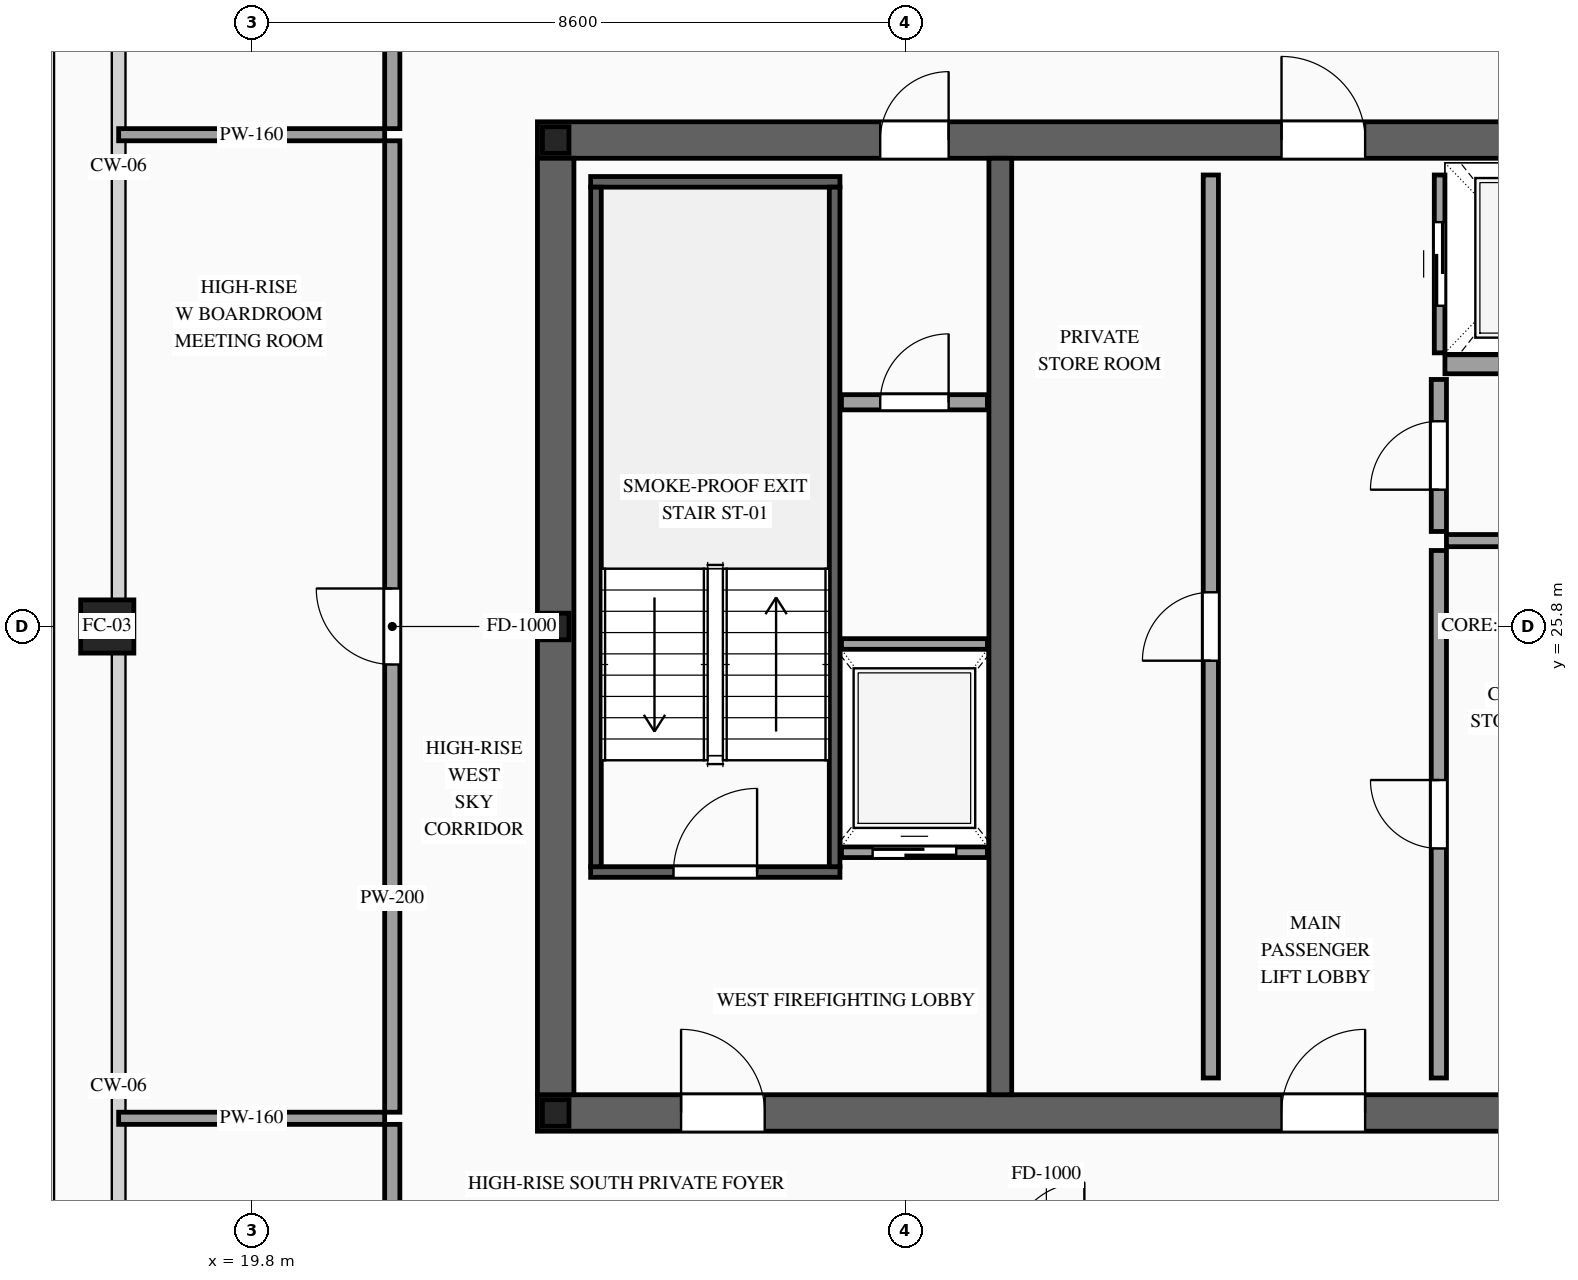
"""IFC4 building model, lengths in metres.
Left out: names, types, materials, properties, quantities, classifications, styles, units other than length and angle.
Written with IfcOpenShell. Run it as: python <this file> out.ifc"""

import sys

from ifc_helpers import new_model, si_unit, direction, frame, frame_2d, origin, origin_2d, place, context, subcontext, project, spatial, rectangle, hollow_rectangle, i_section, extrude, source, transform, mapped, element, fill, save


model = new_model("IFC4")
c1 = context("Model", 3, precision=1e-05, world=origin(), true_north=direction((0.0, 1.0)))
c2 = subcontext(c1, "Body", "Model", "MODEL_VIEW")
j1 = project(units=[si_unit("LENGTHUNIT", "METRE"), si_unit("PLANEANGLEUNIT", "RADIAN")], contexts=[c1])
p1 = place(None, origin())
s1 = spatial("IfcSite", under=j1, at=p1, CompositionType="ELEMENT")
p2 = place(p1, origin())
s2 = spatial("IfcBuilding", under=s1, at=p2, CompositionType="ELEMENT")
p3 = place(p2, frame((0.0, 0.0, 325.2)))
s3 = spatial("IfcBuildingStorey", under=s2, at=p3, CompositionType="ELEMENT", Elevation=325.2)
p4 = place(p3, frame((23.56, 19.4, 0.0), z_axis=(0.0, 0.0, 1.0), x_axis=(1.0, 0.0, 0.0)))
e1 = element("IfcWall", 1, at=p4, inside=s3, PredefinedType="SHEAR", context=c2, shape_type="SweptSolid", body=[
    extrude(rectangle(XDim=26.88, YDim=0.48, at=frame_2d((13.44, 0.0))), origin(), (0.0, 0.0, 1.0), 3.5),
])
p5 = place(p4, frame((1.89, 0.0, 0.0)))
e2 = element("IfcOpeningElement", 2, at=p5, cuts=e1, PredefinedType="OPENING", context=c2, shape_type="SweptSolid", body=[
    extrude(rectangle(XDim=1.1, YDim=2.2, at=frame_2d((0.55, 1.1))), frame((0.0, 0.255, 0.0), z_axis=(0.0, -1.0, 0.0), x_axis=(1.0, 0.0, 0.0)), (0.0, 0.0, 1.0), 0.51),
])
p6 = place(p4, frame((9.79, 0.0, 0.0)))
e3 = element("IfcOpeningElement", 3, at=p6, cuts=e1, PredefinedType="OPENING", context=c2, shape_type="SweptSolid", body=[
    extrude(rectangle(XDim=1.1, YDim=2.2, at=frame_2d((0.55, 1.1))), frame((0.0, 0.255, 0.0), z_axis=(0.0, -1.0, 0.0), x_axis=(1.0, 0.0, 0.0)), (0.0, 0.0, 1.0), 0.51),
])
p7 = place(p4, frame((22.99, 0.0, 0.0)))
e4 = element("IfcOpeningElement", 4, at=p7, cuts=e1, PredefinedType="OPENING", context=c2, shape_type="SweptSolid", body=[
    extrude(rectangle(XDim=1.1, YDim=2.2, at=frame_2d((0.55, 1.1))), frame((0.0, 0.255, 0.0), z_axis=(0.0, -1.0, 0.0), x_axis=(1.0, 0.0, 0.0)), (0.0, 0.0, 1.0), 0.51),
])
p8 = place(p4, frame((19.61, 0.0, 0.0)))
e5 = element("IfcOpeningElement", 5, at=p8, cuts=e1, PredefinedType="OPENING", context=c2, shape_type="SweptSolid", body=[
    extrude(rectangle(XDim=0.9, YDim=2.15, at=frame_2d((0.45, 1.075))), frame((0.0, 0.255, 0.0), z_axis=(0.0, -1.0, 0.0), x_axis=(1.0, 0.0, 0.0)), (0.0, 0.0, 1.0), 0.51),
])
p9 = place(p4, frame((18.17, 0.0, 0.0)))
e6 = element("IfcOpeningElement", 6, at=p9, cuts=e1, PredefinedType="OPENING", context=c2, shape_type="SweptSolid", body=[
    extrude(rectangle(XDim=0.9, YDim=2.15, at=frame_2d((0.45, 1.075))), frame((0.0, 0.255, 0.0), z_axis=(0.0, -1.0, 0.0), x_axis=(1.0, 0.0, 0.0)), (0.0, 0.0, 1.0), 0.51),
])
p10 = place(p3, frame((23.56, 32.2, 0.0), z_axis=(0.0, 0.0, 1.0), x_axis=(1.0, 0.0, 0.0)))
e7 = element("IfcWall", 7, at=p10, inside=s3, PredefinedType="SHEAR", context=c2, shape_type="SweptSolid", body=[
    extrude(rectangle(XDim=26.88, YDim=0.48, at=frame_2d((13.44, 0.0))), origin(), (0.0, 0.0, 1.0), 3.5),
])
p11 = place(p10, frame((4.51, 0.0, 0.0)))
e8 = element("IfcOpeningElement", 8, at=p11, cuts=e7, PredefinedType="OPENING", context=c2, shape_type="SweptSolid", body=[
    extrude(rectangle(XDim=0.9, YDim=2.15, at=frame_2d((0.45, 1.075))), frame((0.0, 0.255, 0.0), z_axis=(0.0, -1.0, 0.0), x_axis=(1.0, 0.0, 0.0)), (0.0, 0.0, 1.0), 0.51),
])
p12 = place(p10, frame((9.79, 0.0, 0.0)))
e9 = element("IfcOpeningElement", 9, at=p12, cuts=e7, PredefinedType="OPENING", context=c2, shape_type="SweptSolid", body=[
    extrude(rectangle(XDim=1.1, YDim=2.2, at=frame_2d((0.55, 1.1))), frame((0.0, 0.255, 0.0), z_axis=(0.0, -1.0, 0.0), x_axis=(1.0, 0.0, 0.0)), (0.0, 0.0, 1.0), 0.51),
])
p13 = place(p10, frame((15.64, 0.0, 0.0)))
e10 = element("IfcOpeningElement", 10, at=p13, cuts=e7, PredefinedType="OPENING", context=c2, shape_type="SweptSolid", body=[
    extrude(rectangle(XDim=1.1, YDim=2.2, at=frame_2d((0.55, 1.1))), frame((0.0, 0.255, 0.0), z_axis=(0.0, -1.0, 0.0), x_axis=(1.0, 0.0, 0.0)), (0.0, 0.0, 1.0), 0.51),
])
p14 = place(p10, frame((18.74, 0.0, 0.0)))
e11 = element("IfcOpeningElement", 11, at=p14, cuts=e7, PredefinedType="OPENING", context=c2, shape_type="SweptSolid", body=[
    extrude(rectangle(XDim=1.1, YDim=2.2, at=frame_2d((0.55, 1.1))), frame((0.0, 0.255, 0.0), z_axis=(0.0, -1.0, 0.0), x_axis=(1.0, 0.0, 0.0)), (0.0, 0.0, 1.0), 0.51),
])
m1 = source(origin(), c2, "Body", "SweptSolid", [
    extrude(rectangle(XDim=12.32, YDim=0.48, at=frame_2d((6.16, 0.0))), origin(), (0.0, 0.0, 1.0), 3.5),
])
p15 = place(p3, frame((23.8, 19.64, 0.0), z_axis=(0.0, 0.0, 1.0), x_axis=(0.0, 1.0, 0.0)))
e12 = element("IfcWall", 12, at=p15, inside=s3, PredefinedType="SHEAR", context=c2, shape_type="MappedRepresentation", body=[
    mapped(m1, transform((0.0, 0.0, 0.0), scale=1.0)),
])
m2 = source(origin(), c2, "Body", "SweptSolid", [
    extrude(rectangle(XDim=12.32, YDim=0.3, at=frame_2d((6.16, 0.0))), origin(), (0.0, 0.0, 1.0), 3.5),
])
p16 = place(p3, frame((29.65, 19.64, 0.0), z_axis=(0.0, 0.0, 1.0), x_axis=(0.0, 1.0, 0.0)))
e13 = element("IfcWall", 13, at=p16, inside=s3, PredefinedType="SOLIDWALL", context=c2, shape_type="MappedRepresentation", body=[
    mapped(m2, transform((0.0, 0.0, 0.0), scale=1.0)),
])
m3 = source(origin(), c2, "Body", "SweptSolid", [
    extrude(i_section(OverallWidth=0.35, OverallDepth=0.35, WebThickness=0.012, FlangeThickness=0.019, at=origin_2d()), origin(), (0.0, 0.0, 1.0), 3.5),
])
for number, where, z_axis, x_axis in (
    (14, (23.8, 19.4, 0.0), (0.0, 0.0, 1.0), (1.0, 0.0, 0.0)),
    (15, (23.8, 25.8, 0.0), (0.0, 0.0, 1.0), (1.0, 0.0, 0.0)),
    (16, (23.8, 32.2, 0.0), (0.0, 0.0, 1.0), (1.0, 0.0, 0.0)),
):
    element("IfcColumn", number, at=place(p3, frame(where, z_axis=z_axis, x_axis=x_axis)), inside=s3, PredefinedType="COLUMN", context=c2, shape_type="MappedRepresentation", body=[
        mapped(m3, transform((0.0, 0.0, 0.0), scale=1.0)),
    ])
m4 = source(origin(), c2, "Body", "SweptSolid", [
    extrude(hollow_rectangle(XDim=0.7, YDim=0.7, WallThickness=0.032, at=origin_2d()), origin(), (0.0, 0.0, 1.0), 3.5),
])
p17 = place(p3, frame((17.9, 25.8, 0.0), z_axis=(0.0, 0.0, 1.0), x_axis=(1.0, 0.0, 0.0)))
e17 = element("IfcColumn", 17, at=p17, inside=s3, PredefinedType="COLUMN", context=c2, shape_type="MappedRepresentation", body=[
    mapped(m4, transform((0.0, 0.0, 0.0), scale=1.0)),
])
p18 = place(p3, frame((27.56, 22.83, 0.0), z_axis=(0.0, 0.0, 1.0), x_axis=(1.0, 0.0, 0.0)))
e18 = element("IfcWall", 18, at=p18, inside=s3, PredefinedType="SOLIDWALL", context=c2, shape_type="SweptSolid", body=[
    extrude(rectangle(XDim=1.92, YDim=0.14, at=frame_2d((0.96, 0.0))), origin(), (0.0, 0.0, 1.0), 3.28),
])
p19 = place(p18, frame((0.41, 0.0, 0.0)))
e19 = element("IfcOpeningElement", 19, at=p19, cuts=e18, PredefinedType="OPENING", context=c2, shape_type="SweptSolid", body=[
    extrude(rectangle(XDim=1.1, YDim=2.2, at=frame_2d((0.55, 1.1))), frame((0.0, 0.085, 0.0), z_axis=(0.0, -1.0, 0.0), x_axis=(1.0, 0.0, 0.0)), (0.0, 0.0, 1.0), 0.17),
])
m5 = source(origin(), c2, "Body", "SweptSolid", [
    extrude(rectangle(XDim=1.92, YDim=0.14, at=frame_2d((0.96, 0.0))), origin(), (0.0, 0.0, 1.0), 3.28),
])
p20 = place(p3, frame((27.56, 25.57, 0.0), z_axis=(0.0, 0.0, 1.0), x_axis=(1.0, 0.0, 0.0)))
e20 = element("IfcWall", 20, at=p20, inside=s3, PredefinedType="SOLIDWALL", context=c2, shape_type="MappedRepresentation", body=[
    mapped(m5, transform((0.0, 0.0, 0.0), scale=1.0)),
])
p21 = place(p3, frame((35.43, 29.4, 0.0), z_axis=(0.0, 0.0, 1.0), x_axis=(0.0, 1.0, 0.0)))
e21 = element("IfcWall", 21, at=p21, inside=s3, PredefinedType="SOLIDWALL", context=c2, shape_type="SweptSolid", body=[
    extrude(rectangle(XDim=2.34, YDim=0.14, at=frame_2d((1.17, 0.0))), origin(), (0.0, 0.0, 1.0), 3.28),
])
p22 = place(p21, frame((0.62, 0.0, 0.0)))
e22 = element("IfcOpeningElement", 22, at=p22, cuts=e21, PredefinedType="OPENING", context=c2, shape_type="SweptSolid", body=[
    extrude(rectangle(XDim=1.1, YDim=2.2, at=frame_2d((0.55, 1.1))), frame((0.0, 0.085, 0.0), z_axis=(0.0, -1.0, 0.0), x_axis=(1.0, 0.0, 0.0)), (0.0, 0.0, 1.0), 0.17),
])
m6 = source(origin(), c2, "Body", "SweptSolid", [
    extrude(rectangle(XDim=2.4, YDim=0.25, at=frame_2d((1.2, 0.0))), origin(), (0.0, 0.0, 1.0), 3.28),
])
p23 = place(p3, frame((35.5, 29.25, 0.0), z_axis=(0.0, 0.0, 1.0), x_axis=(1.0, 0.0, 0.0)))
e23 = element("IfcWall", 23, at=p23, inside=s3, PredefinedType="SOLIDWALL", context=c2, shape_type="MappedRepresentation", body=[
    mapped(m6, transform((0.0, 0.0, 0.0), scale=1.0)),
])
p24 = place(p3, frame((24.26, 22.57, 0.0), z_axis=(0.0, 0.0, 1.0), x_axis=(1.0, 0.0, 0.0)))
e24 = element("IfcWall", 24, at=p24, inside=s3, PredefinedType="SOLIDWALL", context=c2, shape_type="SweptSolid", body=[
    extrude(rectangle(XDim=3.28, YDim=0.14, at=frame_2d((1.64, 0.0))), origin(), (0.0, 0.0, 1.0), 3.28),
])
p25 = place(p24, frame((1.09, 0.0, 0.0)))
e25 = element("IfcOpeningElement", 25, at=p25, cuts=e24, PredefinedType="OPENING", context=c2, shape_type="SweptSolid", body=[
    extrude(rectangle(XDim=1.1, YDim=2.2, at=frame_2d((0.55, 1.1))), frame((0.0, 0.085, 0.0), z_axis=(0.0, -1.0, 0.0), x_axis=(1.0, 0.0, 0.0)), (0.0, 0.0, 1.0), 0.17),
])
m7 = source(origin(), c2, "Body", "SweptSolid", [
    extrude(rectangle(XDim=3.28, YDim=0.14, at=frame_2d((1.64, 0.0))), origin(), (0.0, 0.0, 1.0), 3.28),
])
p26 = place(p3, frame((24.26, 31.65, 0.0), z_axis=(0.0, 0.0, 1.0), x_axis=(1.0, 0.0, 0.0)))
e26 = element("IfcWall", 26, at=p26, inside=s3, PredefinedType="SOLIDWALL", context=c2, shape_type="MappedRepresentation", body=[
    mapped(m7, transform((0.0, 0.0, 0.0), scale=1.0)),
])
m8 = source(origin(), c2, "Body", "SweptSolid", [
    extrude(rectangle(XDim=8.94, YDim=0.14, at=frame_2d((4.47, 0.0))), origin(), (0.0, 0.0, 1.0), 3.28),
])
for number, where, z_axis, x_axis in (
    (27, (24.33, 22.64, 0.0), (0.0, 0.0, 1.0), (0.0, 1.0, 0.0)),
    (28, (27.47, 22.64, 0.0), (0.0, 0.0, 1.0), (0.0, 1.0, 0.0)),
):
    element("IfcWall", number, at=place(p3, frame(where, z_axis=z_axis, x_axis=x_axis)), inside=s3, PredefinedType="SOLIDWALL", context=c2, shape_type="MappedRepresentation", body=[
        mapped(m8, transform((0.0, 0.0, 0.0), scale=1.0)),
    ])
p27 = place(p3, frame((27.56, 28.75, 0.0), z_axis=(0.0, 0.0, 1.0), x_axis=(1.0, 0.0, 0.0)))
e29 = element("IfcWall", 29, at=p27, inside=s3, PredefinedType="PARTITIONING", context=c2, shape_type="SweptSolid", body=[
    extrude(rectangle(XDim=1.92, YDim=0.2, at=frame_2d((0.96, 0.0))), origin(), (0.0, 0.0, 1.0), 3.28),
])
p28 = place(p27, frame((0.51, 0.0, 0.0)))
e30 = element("IfcOpeningElement", 30, at=p28, cuts=e29, PredefinedType="OPENING", context=c2, shape_type="SweptSolid", body=[
    extrude(rectangle(XDim=0.9, YDim=2.15, at=frame_2d((0.45, 1.075))), frame((0.0, 0.115, 0.0), z_axis=(0.0, -1.0, 0.0), x_axis=(1.0, 0.0, 0.0)), (0.0, 0.0, 1.0), 0.23),
])
p29 = place(p3, frame((32.42, 19.86, 0.0), z_axis=(0.0, 0.0, 1.0), x_axis=(0.0, 1.0, 0.0)))
e31 = element("IfcWall", 31, at=p29, inside=s3, PredefinedType="PARTITIONING", context=c2, shape_type="SweptSolid", body=[
    extrude(rectangle(XDim=11.88, YDim=0.2, at=frame_2d((5.94, 0.0))), origin(), (0.0, 0.0, 1.0), 3.28),
])
p30 = place(p29, frame((5.49, 0.0, 0.0)))
e32 = element("IfcOpeningElement", 32, at=p30, cuts=e31, PredefinedType="OPENING", context=c2, shape_type="SweptSolid", body=[
    extrude(rectangle(XDim=0.9, YDim=2.15, at=frame_2d((0.45, 1.075))), frame((0.0, 0.115, 0.0), z_axis=(0.0, -1.0, 0.0), x_axis=(1.0, 0.0, 0.0)), (0.0, 0.0, 1.0), 0.23),
])
p31 = place(p3, frame((35.42, 19.86, 0.0), z_axis=(0.0, 0.0, 1.0), x_axis=(0.0, 1.0, 0.0)))
e33 = element("IfcWall", 33, at=p31, inside=s3, PredefinedType="PARTITIONING", context=c2, shape_type="SweptSolid", body=[
    extrude(rectangle(XDim=6.94, YDim=0.2, at=frame_2d((3.47, 0.0))), origin(), (0.0, 0.0, 1.0), 3.28),
])
p32 = place(p31, frame((3.02, 0.0, 0.0)))
e34 = element("IfcOpeningElement", 34, at=p32, cuts=e33, PredefinedType="OPENING", context=c2, shape_type="SweptSolid", body=[
    extrude(rectangle(XDim=0.9, YDim=2.15, at=frame_2d((0.45, 1.075))), frame((0.0, 0.115, 0.0), z_axis=(0.0, -1.0, 0.0), x_axis=(1.0, 0.0, 0.0)), (0.0, 0.0, 1.0), 0.23),
])
p33 = place(p3, frame((35.42, 27.05, 0.0), z_axis=(0.0, 0.0, 1.0), x_axis=(0.0, 1.0, 0.0)))
e35 = element("IfcWall", 35, at=p33, inside=s3, PredefinedType="PARTITIONING", context=c2, shape_type="SweptSolid", body=[
    extrude(rectangle(XDim=2.0, YDim=0.2, at=frame_2d((1.0, 0.0))), origin(), (0.0, 0.0, 1.0), 3.28),
])
p34 = place(p33, frame((0.55, 0.0, 0.0)))
e36 = element("IfcOpeningElement", 36, at=p34, cuts=e35, PredefinedType="OPENING", context=c2, shape_type="SweptSolid", body=[
    extrude(rectangle(XDim=0.9, YDim=2.15, at=frame_2d((0.45, 1.075))), frame((0.0, 0.115, 0.0), z_axis=(0.0, -1.0, 0.0), x_axis=(1.0, 0.0, 0.0)), (0.0, 0.0, 1.0), 0.23),
])
m9 = source(origin(), c2, "Body", "SweptSolid", [
    extrude(rectangle(XDim=2.36, YDim=0.16, at=frame_2d((1.18, 0.0))), origin(), (0.0, 0.0, 1.0), 3.28),
])
p35 = place(p3, frame((35.52, 26.93, 0.0), z_axis=(0.0, 0.0, 1.0), x_axis=(1.0, 0.0, 0.0)))
e37 = element("IfcWall", 37, at=p35, inside=s3, PredefinedType="PARTITIONING", context=c2, shape_type="MappedRepresentation", body=[
    mapped(m9, transform((0.0, 0.0, 0.0), scale=1.0)),
])
m10 = source(origin(), c2, "Body", "SweptSolid", [
    extrude(rectangle(XDim=1.7, YDim=0.2, at=frame_2d((0.85, 0.0))), origin(), (0.0, 0.0, 1.0), 3.28),
])
for number, where, z_axis, x_axis in (
    (38, (21.65, 32.35, 0.0), (0.0, 0.0, 1.0), (0.0, 1.0, 0.0)),
    (39, (21.65, 17.55, 0.0), (0.0, 0.0, 1.0), (0.0, 1.0, 0.0)),
):
    element("IfcWall", number, at=place(p3, frame(where, z_axis=z_axis, x_axis=x_axis)), inside=s3, PredefinedType="PARTITIONING", context=c2, shape_type="MappedRepresentation", body=[
        mapped(m10, transform((0.0, 0.0, 0.0), scale=1.0)),
    ])
p36 = place(p3, frame((21.65, 19.41, 0.0), z_axis=(0.0, 0.0, 1.0), x_axis=(0.0, 1.0, 0.0)))
e40 = element("IfcWall", 40, at=p36, inside=s3, PredefinedType="PARTITIONING", context=c2, shape_type="SweptSolid", body=[
    extrude(rectangle(XDim=12.78, YDim=0.2, at=frame_2d((6.39, 0.0))), origin(), (0.0, 0.0, 1.0), 3.28),
])
p37 = place(p36, frame((5.89, 0.0, 0.0)))
e41 = element("IfcOpeningElement", 41, at=p37, cuts=e40, PredefinedType="OPENING", context=c2, shape_type="SweptSolid", body=[
    extrude(rectangle(XDim=1.0, YDim=2.2, at=frame_2d((0.5, 1.1))), frame((0.0, 0.115, 0.0), z_axis=(0.0, -1.0, 0.0), x_axis=(1.0, 0.0, 0.0)), (0.0, 0.0, 1.0), 0.23),
])
m11 = source(origin(), c2, "Body", "SweptSolid", [
    extrude(rectangle(XDim=3.5, YDim=0.16, at=frame_2d((1.75, 0.0))), origin(), (0.0, 0.0, 1.0), 2.825),
])
for number, where, z_axis, x_axis in (
    (42, (18.05, 19.33, 0.0), (0.0, 0.0, 1.0), (1.0, 0.0, 0.0)),
    (43, (18.05, 32.27, 0.0), (0.0, 0.0, 1.0), (1.0, 0.0, 0.0)),
):
    element("IfcWall", number, at=place(p3, frame(where, z_axis=z_axis, x_axis=x_axis)), inside=s3, PredefinedType="PARTITIONING", context=c2, shape_type="MappedRepresentation", body=[
        mapped(m11, transform((0.0, 0.0, 0.0), scale=1.0)),
    ])
m12 = source(origin(), c2, "Body", "SweptSolid", [
    extrude(rectangle(XDim=1.1, YDim=2.2, at=frame_2d((0.55, 1.1))), frame((0.0, 0.025, 0.0), z_axis=(0.0, -1.0, 0.0), x_axis=(1.0, 0.0, 0.0)), (0.0, 0.0, 1.0), 0.05),
])
p38 = place(p19, origin())
e44 = element("IfcDoor", 44, at=p38, inside=s3, OperationType="SLIDING_TO_LEFT", PredefinedType="DOOR", context=c2, shape_type="MappedRepresentation", body=[
    mapped(m12, transform((0.0, 0.0, 0.0), scale=1.0)),
])
fill(e19, e44)
p39 = place(p22, origin())
e45 = element("IfcDoor", 45, at=p39, inside=s3, OperationType="SLIDING_TO_RIGHT", PredefinedType="DOOR", context=c2, shape_type="MappedRepresentation", body=[
    mapped(m12, transform((0.0, 0.0, 0.0), scale=1.0)),
])
fill(e22, e45)
m13 = source(origin(), c2, "Body", "SweptSolid", [
    extrude(rectangle(XDim=1.1, YDim=2.2, at=frame_2d((0.55, 1.1))), frame((0.0, 0.025, 0.0), z_axis=(0.0, -1.0, 0.0), x_axis=(1.0, 0.0, 0.0)), (0.0, 0.0, 1.0), 0.05),
])
p40 = place(p25, origin())
e46 = element("IfcDoor", 46, at=p40, inside=s3, OperationType="SINGLE_SWING_RIGHT", PredefinedType="DOOR", context=c2, shape_type="MappedRepresentation", body=[
    mapped(m13, transform((0.0, 0.0, 0.0), scale=1.0)),
])
fill(e25, e46)
p41 = place(p5, origin())
e47 = element("IfcDoor", 47, at=p41, inside=s3, OperationType="SINGLE_SWING_LEFT", PredefinedType="DOOR", context=c2, shape_type="MappedRepresentation", body=[
    mapped(m13, transform((0.0, 0.0, 0.0), scale=1.0)),
])
fill(e2, e47)
p42 = place(p6, origin())
e48 = element("IfcDoor", 48, at=p42, inside=s3, OperationType="SINGLE_SWING_RIGHT", PredefinedType="DOOR", context=c2, shape_type="MappedRepresentation", body=[
    mapped(m13, transform((0.0, 0.0, 0.0), scale=1.0)),
])
fill(e3, e48)
m14 = source(origin(), c2, "Body", "SweptSolid", [
    extrude(rectangle(XDim=0.9, YDim=2.15, at=frame_2d((0.45, 1.075))), frame((0.0, 0.025, 0.0), z_axis=(0.0, -1.0, 0.0), x_axis=(1.0, 0.0, 0.0)), (0.0, 0.0, 1.0), 0.05),
])
p43 = place(p11, origin())
e49 = element("IfcDoor", 49, at=p43, inside=s3, OperationType="SINGLE_SWING_RIGHT", PredefinedType="DOOR", context=c2, shape_type="MappedRepresentation", body=[
    mapped(m14, transform((0.0, 0.0, 0.0), scale=1.0)),
])
fill(e8, e49)
p44 = place(p12, origin())
e50 = element("IfcDoor", 50, at=p44, inside=s3, OperationType="SINGLE_SWING_LEFT", PredefinedType="DOOR", context=c2, shape_type="MappedRepresentation", body=[
    mapped(m13, transform((0.0, 0.0, 0.0), scale=1.0)),
])
fill(e9, e50)
p45 = place(p28, origin())
e51 = element("IfcDoor", 51, at=p45, inside=s3, OperationType="SINGLE_SWING_RIGHT", PredefinedType="DOOR", context=c2, shape_type="MappedRepresentation", body=[
    mapped(m14, transform((0.0, 0.0, 0.0), scale=1.0)),
])
fill(e30, e51)
p46 = place(p30, origin())
e52 = element("IfcDoor", 52, at=p46, inside=s3, OperationType="SINGLE_SWING_LEFT", PredefinedType="DOOR", context=c2, shape_type="MappedRepresentation", body=[
    mapped(m14, transform((0.0, 0.0, 0.0), scale=1.0)),
])
fill(e32, e52)
p47 = place(p32, origin())
e53 = element("IfcDoor", 53, at=p47, inside=s3, OperationType="SINGLE_SWING_RIGHT", PredefinedType="DOOR", context=c2, shape_type="MappedRepresentation", body=[
    mapped(m14, transform((0.0, 0.0, 0.0), scale=1.0)),
])
fill(e34, e53)
p48 = place(p34, origin())
e54 = element("IfcDoor", 54, at=p48, inside=s3, OperationType="SINGLE_SWING_LEFT", PredefinedType="DOOR", context=c2, shape_type="MappedRepresentation", body=[
    mapped(m14, transform((0.0, 0.0, 0.0), scale=1.0)),
])
fill(e36, e54)
m15 = source(origin(), c2, "Body", "SweptSolid", [
    extrude(rectangle(XDim=1.0, YDim=2.2, at=frame_2d((0.5, 1.1))), frame((0.0, 0.025, 0.0), z_axis=(0.0, -1.0, 0.0), x_axis=(1.0, 0.0, 0.0)), (0.0, 0.0, 1.0), 0.05),
])
p49 = place(p37, origin())
e55 = element("IfcDoor", 55, at=p49, inside=s3, OperationType="SINGLE_SWING_RIGHT", PredefinedType="DOOR", context=c2, shape_type="MappedRepresentation", body=[
    mapped(m15, transform((0.0, 0.0, 0.0), scale=1.0)),
])
fill(e41, e55)
save(model, sys.argv[1])
